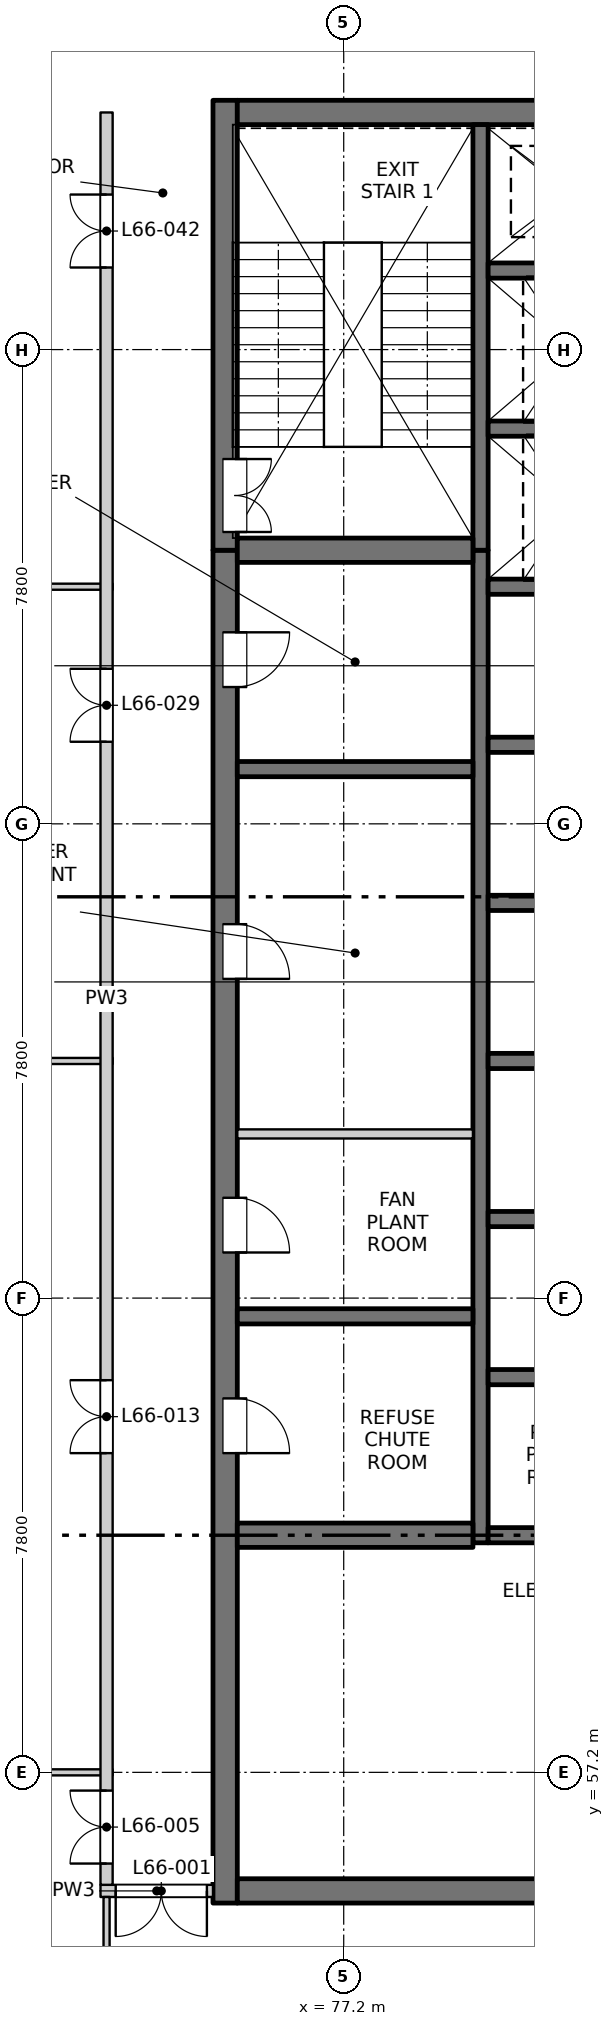
"""IFC4 building model, lengths in metres.
Left out: names, types, materials, properties, quantities, classifications, styles, units other than length and angle.
Written with IfcOpenShell. Run it as: python <this file> out.ifc"""

import sys

from ifc_helpers import new_model, si_unit, direction, frame, frame_2d, origin, place, context, subcontext, project, spatial, rectangle, extrude, element, fill, save


model = new_model("IFC4")
c1 = context("Model", 3, precision=1e-05, world=origin(), true_north=direction((0.0, 1.0)))
c2 = subcontext(c1, "Body", "Model", "MODEL_VIEW")
j1 = project(units=[si_unit("LENGTHUNIT", "METRE"), si_unit("PLANEANGLEUNIT", "RADIAN")], contexts=[c1])
p1 = place(None, origin())
s1 = spatial("IfcSite", under=j1, at=p1, CompositionType="ELEMENT")
p2 = place(p1, origin())
s2 = spatial("IfcBuilding", under=s1, at=p2, CompositionType="ELEMENT")
p3 = place(p2, frame((0.0, 0.0, 241.5)))
s3 = spatial("IfcBuildingStorey", under=s2, at=p3, CompositionType="ELEMENT", Elevation=241.5)
p4 = place(p3, frame((75.25, 55.05, -0.3), z_axis=(0.0, 0.0, 1.0), x_axis=(0.0, 1.0, 0.0)))
e1 = element("IfcWall", 1, at=p4, inside=s3, PredefinedType="SOLIDWALL", context=c2, shape_type="SweptSolid", body=[
    extrude(rectangle(XDim=22.25, YDim=0.4, at=frame_2d((11.125, 0.0))), origin(), (0.0, 0.0, 1.0), 4.5),
])
p5 = place(p4, frame((7.4, 0.0, 0.3)))
e2 = element("IfcOpeningElement", 2, at=p5, cuts=e1, PredefinedType="OPENING", context=c2, shape_type="SweptSolid", body=[
    extrude(rectangle(XDim=0.9, YDim=2.1, at=frame_2d((0.45, 1.05))), frame((0.0, 0.21, 0.0), z_axis=(0.0, -1.0, 0.0), x_axis=(1.0, 0.0, 0.0)), (0.0, 0.0, 1.0), 0.42),
])
p6 = place(p4, frame((10.7, 0.0, 0.3)))
e3 = element("IfcOpeningElement", 3, at=p6, cuts=e1, PredefinedType="OPENING", context=c2, shape_type="SweptSolid", body=[
    extrude(rectangle(XDim=0.9, YDim=2.1, at=frame_2d((0.45, 1.05))), frame((0.0, 0.21, 0.0), z_axis=(0.0, -1.0, 0.0), x_axis=(1.0, 0.0, 0.0)), (0.0, 0.0, 1.0), 0.42),
])
p7 = place(p4, frame((15.2, 0.0, 0.3)))
e4 = element("IfcOpeningElement", 4, at=p7, cuts=e1, PredefinedType="OPENING", context=c2, shape_type="SweptSolid", body=[
    extrude(rectangle(XDim=0.9, YDim=2.1, at=frame_2d((0.45, 1.05))), frame((0.0, 0.21, 0.0), z_axis=(0.0, -1.0, 0.0), x_axis=(1.0, 0.0, 0.0)), (0.0, 0.0, 1.0), 0.42),
])
p8 = place(p4, frame((20.0, 0.0, 0.3)))
e5 = element("IfcOpeningElement", 5, at=p8, cuts=e1, PredefinedType="OPENING", context=c2, shape_type="SweptSolid", body=[
    extrude(rectangle(XDim=0.9, YDim=2.1, at=frame_2d((0.45, 1.05))), frame((0.0, 0.21, 0.0), z_axis=(0.0, -1.0, 0.0), x_axis=(1.0, 0.0, 0.0)), (0.0, 0.0, 1.0), 0.42),
])
p9 = place(p3, frame((75.25, 77.3, -0.3), z_axis=(0.0, 0.0, 1.0), x_axis=(0.0, 1.0, 0.0)))
e6 = element("IfcWall", 6, at=p9, inside=s3, PredefinedType="SOLIDWALL", context=c2, shape_type="SweptSolid", body=[
    extrude(rectangle(XDim=7.4, YDim=0.4, at=frame_2d((3.7, 0.0))), origin(), (0.0, 0.0, 1.0), 4.5),
])
p10 = place(p9, frame((0.3, 0.0, 0.3)))
e7 = element("IfcOpeningElement", 7, at=p10, cuts=e6, PredefinedType="OPENING", context=c2, shape_type="SweptSolid", body=[
    extrude(rectangle(XDim=1.2, YDim=2.1, at=frame_2d((0.6, 1.05))), frame((0.0, 0.21, 0.0), z_axis=(0.0, -1.0, 0.0), x_axis=(1.0, 0.0, 0.0)), (0.0, 0.0, 1.0), 0.42),
])
p11 = place(p3, frame((75.45, 55.25, -0.3), z_axis=(0.0, 0.0, 1.0), x_axis=(1.0, 0.0, 0.0)))
e8 = element("IfcWall", 8, at=p11, inside=s3, PredefinedType="SOLIDWALL", context=c2, shape_type="SweptSolid", body=[
    extrude(rectangle(XDim=19.1, YDim=0.4, at=frame_2d((9.55, 0.0))), origin(), (0.0, 0.0, 1.0), 4.5),
])
p12 = place(p11, frame((7.3, 0.0, 0.3)))
e9 = element("IfcOpeningElement", 9, at=p12, cuts=e8, PredefinedType="OPENING", context=c2, shape_type="SweptSolid", body=[
    extrude(rectangle(XDim=1.5, YDim=2.1, at=frame_2d((0.75, 1.05))), frame((0.0, 0.21, 0.0), z_axis=(0.0, -1.0, 0.0), x_axis=(1.0, 0.0, 0.0)), (0.0, 0.0, 1.0), 0.42),
])
p13 = place(p3, frame((75.45, 84.5, -0.3), z_axis=(0.0, 0.0, 1.0), x_axis=(1.0, 0.0, 0.0)))
e10 = element("IfcWall", 10, at=p13, inside=s3, PredefinedType="SOLIDWALL", context=c2, shape_type="SweptSolid", body=[
    extrude(rectangle(XDim=19.1, YDim=0.4, at=frame_2d((9.55, 0.0))), origin(), (0.0, 0.0, 1.0), 4.5),
])
p14 = place(p3, frame((79.45, 60.975, -0.3), z_axis=(0.0, 0.0, 1.0), x_axis=(0.0, 1.0, 0.0)))
e11 = element("IfcWall", 11, at=p14, inside=s3, PredefinedType="SOLIDWALL", context=c2, shape_type="SweptSolid", body=[
    extrude(rectangle(XDim=16.325, YDim=0.25, at=frame_2d((8.163, 0.0))), origin(), (0.0, 0.0, 1.0), 4.5),
])
p15 = place(p3, frame((79.45, 77.3, -0.3), z_axis=(0.0, 0.0, 1.0), x_axis=(0.0, 1.0, 0.0)))
e12 = element("IfcWall", 12, at=p15, inside=s3, PredefinedType="SOLIDWALL", context=c2, shape_type="SweptSolid", body=[
    extrude(rectangle(XDim=7.0, YDim=0.25, at=frame_2d((3.5, 0.0))), origin(), (0.0, 0.0, 1.0), 4.5),
])
for number, where, z_axis, x_axis in (
    (13, (79.575, 61.1, -0.3), (0.0, 0.0, 1.0), (1.0, 0.0, 0.0)),
    (14, (79.575, 63.7, -0.3), (0.0, 0.0, 1.0), (1.0, 0.0, 0.0)),
    (15, (79.575, 66.3, -0.3), (0.0, 0.0, 1.0), (1.0, 0.0, 0.0)),
    (16, (79.575, 68.9, -0.3), (0.0, 0.0, 1.0), (1.0, 0.0, 0.0)),
    (17, (79.575, 71.5, -0.3), (0.0, 0.0, 1.0), (1.0, 0.0, 0.0)),
    (18, (79.575, 74.1, -0.3), (0.0, 0.0, 1.0), (1.0, 0.0, 0.0)),
    (19, (79.575, 76.7, -0.3), (0.0, 0.0, 1.0), (1.0, 0.0, 0.0)),
    (20, (79.575, 79.3, -0.3), (0.0, 0.0, 1.0), (1.0, 0.0, 0.0)),
    (21, (79.575, 81.9, -0.3), (0.0, 0.0, 1.0), (1.0, 0.0, 0.0)),
):
    element("IfcWall", number, at=place(p3, frame(where, z_axis=z_axis, x_axis=x_axis)), inside=s3, PredefinedType="SOLIDWALL", context=c2, shape_type="SweptSolid", body=[
        extrude(rectangle(XDim=3.0, YDim=0.25, at=frame_2d((1.5, 0.0))), origin(), (0.0, 0.0, 1.0), 4.5),
    ])
p16 = place(p3, frame((75.45, 61.1, -0.3), z_axis=(0.0, 0.0, 1.0), x_axis=(1.0, 0.0, 0.0)))
e22 = element("IfcWall", 22, at=p16, inside=s3, PredefinedType="SOLIDWALL", context=c2, shape_type="SweptSolid", body=[
    extrude(rectangle(XDim=3.875, YDim=0.4, at=frame_2d((1.938, 0.0))), origin(), (0.0, 0.0, 1.0), 4.5),
])
for number, where, z_axis, x_axis in (
    (23, (75.45, 64.7, -0.3), (0.0, 0.0, 1.0), (1.0, 0.0, 0.0)),
    (24, (75.45, 73.7, -0.3), (0.0, 0.0, 1.0), (1.0, 0.0, 0.0)),
):
    element("IfcWall", number, at=place(p3, frame(where, z_axis=z_axis, x_axis=x_axis)), inside=s3, PredefinedType="SOLIDWALL", context=c2, shape_type="SweptSolid", body=[
        extrude(rectangle(XDim=3.875, YDim=0.25, at=frame_2d((1.938, 0.0))), origin(), (0.0, 0.0, 1.0), 4.5),
    ])
p17 = place(p3, frame((75.45, 77.3, -0.3), z_axis=(0.0, 0.0, 1.0), x_axis=(1.0, 0.0, 0.0)))
e25 = element("IfcWall", 25, at=p17, inside=s3, PredefinedType="SOLIDWALL", context=c2, shape_type="SweptSolid", body=[
    extrude(rectangle(XDim=3.875, YDim=0.4, at=frame_2d((1.938, 0.0))), origin(), (0.0, 0.0, 1.0), 4.5),
])
p18 = place(p3, frame((73.2, 55.25, 0.0), z_axis=(0.0, 0.0, 1.0), x_axis=(1.0, 0.0, 0.0)))
e26 = element("IfcWall", 26, at=p18, inside=s3, PredefinedType="PARTITIONING", context=c2, shape_type="SweptSolid", body=[
    extrude(rectangle(XDim=1.85, YDim=0.2, at=frame_2d((0.925, 0.0))), origin(), (0.0, 0.0, 1.0), 4.2),
])
p19 = place(p18, frame((0.25, 0.0, 0.0)))
e27 = element("IfcOpeningElement", 27, at=p19, cuts=e26, PredefinedType="OPENING", context=c2, shape_type="SweptSolid", body=[
    extrude(rectangle(XDim=1.5, YDim=2.1, at=frame_2d((0.75, 1.05))), frame((0.0, 0.11, 0.0), z_axis=(0.0, -1.0, 0.0), x_axis=(1.0, 0.0, 0.0)), (0.0, 0.0, 1.0), 0.22),
])
p20 = place(p3, frame((61.6, 57.2, 0.0), z_axis=(0.0, 0.0, 1.0), x_axis=(1.0, 0.0, 0.0)))
e28 = element("IfcWall", 28, at=p20, inside=s3, PredefinedType="PARTITIONING", context=c2, shape_type="SweptSolid", body=[
    extrude(rectangle(XDim=11.8, YDim=0.1, at=frame_2d((5.9, 0.0))), origin(), (0.0, 0.0, 1.0), 4.2),
])
p21 = place(p3, frame((75.45, 67.7, 0.0), z_axis=(0.0, 0.0, 1.0), x_axis=(1.0, 0.0, 0.0)))
e29 = element("IfcWall", 29, at=p21, inside=s3, PredefinedType="PARTITIONING", context=c2, shape_type="SweptSolid", body=[
    extrude(rectangle(XDim=3.875, YDim=0.15, at=frame_2d((1.938, 0.0))), origin(), (0.0, 0.0, 1.0), 4.2),
])
for number, where, z_axis, x_axis in (
    (30, (65.5, 68.9, 0.0), (0.0, 0.0, 1.0), (1.0, 0.0, 0.0)),
    (31, (65.5, 76.7, 0.0), (0.0, 0.0, 1.0), (1.0, 0.0, 0.0)),
):
    element("IfcWall", number, at=place(p3, frame(where, z_axis=z_axis, x_axis=x_axis)), inside=s3, PredefinedType="PARTITIONING", context=c2, shape_type="SweptSolid", body=[
        extrude(rectangle(XDim=7.9, YDim=0.1, at=frame_2d((3.95, 0.0))), origin(), (0.0, 0.0, 1.0), 3.6),
    ])
p22 = place(p3, frame((73.3, 45.5, 0.0), z_axis=(0.0, 0.0, 1.0), x_axis=(0.0, 1.0, 0.0)))
e32 = element("IfcWall", 32, at=p22, inside=s3, PredefinedType="PARTITIONING", context=c2, shape_type="SweptSolid", body=[
    extrude(rectangle(XDim=9.65, YDim=0.1, at=frame_2d((4.825, 0.0))), origin(), (0.0, 0.0, 1.0), 4.2),
])
p23 = place(p3, frame((73.3, 55.35, 0.0), z_axis=(0.0, 0.0, 1.0), x_axis=(0.0, 1.0, 0.0)))
e33 = element("IfcWall", 33, at=p23, inside=s3, PredefinedType="PARTITIONING", context=c2, shape_type="SweptSolid", body=[
    extrude(rectangle(XDim=29.15, YDim=0.2, at=frame_2d((14.575, 0.0))), origin(), (0.0, 0.0, 1.0), 4.2),
])
p24 = place(p23, frame((0.35, 0.0, 0.0)))
e34 = element("IfcOpeningElement", 34, at=p24, cuts=e33, PredefinedType="OPENING", context=c2, shape_type="SweptSolid", body=[
    extrude(rectangle(XDim=1.2, YDim=2.1, at=frame_2d((0.6, 1.05))), frame((0.0, 0.11, 0.0), z_axis=(0.0, -1.0, 0.0), x_axis=(1.0, 0.0, 0.0)), (0.0, 0.0, 1.0), 0.22),
])
p25 = place(p23, frame((7.1, 0.0, 0.0)))
e35 = element("IfcOpeningElement", 35, at=p25, cuts=e33, PredefinedType="OPENING", context=c2, shape_type="SweptSolid", body=[
    extrude(rectangle(XDim=1.2, YDim=2.1, at=frame_2d((0.6, 1.05))), frame((0.0, 0.11, 0.0), z_axis=(0.0, -1.0, 0.0), x_axis=(1.0, 0.0, 0.0)), (0.0, 0.0, 1.0), 0.22),
])
p26 = place(p23, frame((18.8, 0.0, 0.0)))
e36 = element("IfcOpeningElement", 36, at=p26, cuts=e33, PredefinedType="OPENING", context=c2, shape_type="SweptSolid", body=[
    extrude(rectangle(XDim=1.2, YDim=2.1, at=frame_2d((0.6, 1.05))), frame((0.0, 0.11, 0.0), z_axis=(0.0, -1.0, 0.0), x_axis=(1.0, 0.0, 0.0)), (0.0, 0.0, 1.0), 0.22),
])
p27 = place(p23, frame((26.6, 0.0, 0.0)))
e37 = element("IfcOpeningElement", 37, at=p27, cuts=e33, PredefinedType="OPENING", context=c2, shape_type="SweptSolid", body=[
    extrude(rectangle(XDim=1.2, YDim=2.1, at=frame_2d((0.6, 1.05))), frame((0.0, 0.11, 0.0), z_axis=(0.0, -1.0, 0.0), x_axis=(1.0, 0.0, 0.0)), (0.0, 0.0, 1.0), 0.22),
])
p28 = place(p19, origin())
e38 = element("IfcDoor", 38, at=p28, inside=s3, OperationType="DOUBLE_DOOR_SINGLE_SWING", PredefinedType="DOOR", context=c2, shape_type="SweptSolid", body=[
    extrude(rectangle(XDim=1.5, YDim=2.1, at=frame_2d((0.75, 1.05))), frame((0.0, 0.025, 0.0), z_axis=(0.0, -1.0, 0.0), x_axis=(1.0, 0.0, 0.0)), (0.0, 0.0, 1.0), 0.05),
])
fill(e27, e38)
p29 = place(p24, origin())
e39 = element("IfcDoor", 39, at=p29, inside=s3, OperationType="DOUBLE_DOOR_SINGLE_SWING", PredefinedType="DOOR", context=c2, shape_type="SweptSolid", body=[
    extrude(rectangle(XDim=1.2, YDim=2.1, at=frame_2d((0.6, 1.05))), frame((0.0, 0.025, 0.0), z_axis=(0.0, -1.0, 0.0), x_axis=(1.0, 0.0, 0.0)), (0.0, 0.0, 1.0), 0.05),
])
fill(e34, e39)
p30 = place(p5, origin())
e40 = element("IfcDoor", 40, at=p30, inside=s3, OperationType="SINGLE_SWING_RIGHT", PredefinedType="DOOR", context=c2, shape_type="SweptSolid", body=[
    extrude(rectangle(XDim=0.9, YDim=2.1, at=frame_2d((0.45, 1.05))), frame((0.0, -0.135, 0.0), z_axis=(0.0, -1.0, 0.0), x_axis=(1.0, 0.0, 0.0)), (0.0, 0.0, 1.0), 0.05),
])
fill(e2, e40)
p31 = place(p25, origin())
e41 = element("IfcDoor", 41, at=p31, inside=s3, OperationType="DOUBLE_DOOR_SINGLE_SWING", PredefinedType="DOOR", context=c2, shape_type="SweptSolid", body=[
    extrude(rectangle(XDim=1.2, YDim=2.1, at=frame_2d((0.6, 1.05))), frame((0.0, 0.025, 0.0), z_axis=(0.0, -1.0, 0.0), x_axis=(1.0, 0.0, 0.0)), (0.0, 0.0, 1.0), 0.05),
])
fill(e35, e41)
p32 = place(p6, origin())
e42 = element("IfcDoor", 42, at=p32, inside=s3, OperationType="SINGLE_SWING_RIGHT", PredefinedType="DOOR", context=c2, shape_type="SweptSolid", body=[
    extrude(rectangle(XDim=0.9, YDim=2.1, at=frame_2d((0.45, 1.05))), frame((0.0, -0.135, 0.0), z_axis=(0.0, -1.0, 0.0), x_axis=(1.0, 0.0, 0.0)), (0.0, 0.0, 1.0), 0.05),
])
fill(e3, e42)
p33 = place(p7, origin())
e43 = element("IfcDoor", 43, at=p33, inside=s3, OperationType="SINGLE_SWING_RIGHT", PredefinedType="DOOR", context=c2, shape_type="SweptSolid", body=[
    extrude(rectangle(XDim=0.9, YDim=2.1, at=frame_2d((0.45, 1.05))), frame((0.0, -0.135, 0.0), z_axis=(0.0, -1.0, 0.0), x_axis=(1.0, 0.0, 0.0)), (0.0, 0.0, 1.0), 0.05),
])
fill(e4, e43)
p34 = place(p26, origin())
e44 = element("IfcDoor", 44, at=p34, inside=s3, OperationType="DOUBLE_DOOR_SINGLE_SWING", PredefinedType="DOOR", context=c2, shape_type="SweptSolid", body=[
    extrude(rectangle(XDim=1.2, YDim=2.1, at=frame_2d((0.6, 1.05))), frame((0.0, 0.025, 0.0), z_axis=(0.0, -1.0, 0.0), x_axis=(1.0, 0.0, 0.0)), (0.0, 0.0, 1.0), 0.05),
])
fill(e36, e44)
p35 = place(p8, origin())
e45 = element("IfcDoor", 45, at=p35, inside=s3, OperationType="SINGLE_SWING_LEFT", PredefinedType="DOOR", context=c2, shape_type="SweptSolid", body=[
    extrude(rectangle(XDim=0.9, YDim=2.1, at=frame_2d((0.45, 1.05))), frame((0.0, -0.135, 0.0), z_axis=(0.0, -1.0, 0.0), x_axis=(1.0, 0.0, 0.0)), (0.0, 0.0, 1.0), 0.05),
])
fill(e5, e45)
p36 = place(p10, origin())
e46 = element("IfcDoor", 46, at=p36, inside=s3, OperationType="DOUBLE_DOOR_SINGLE_SWING", PredefinedType="DOOR", context=c2, shape_type="SweptSolid", body=[
    extrude(rectangle(XDim=1.2, YDim=2.1, at=frame_2d((0.6, 1.05))), frame((0.0, -0.135, 0.0), z_axis=(0.0, -1.0, 0.0), x_axis=(1.0, 0.0, 0.0)), (0.0, 0.0, 1.0), 0.05),
])
fill(e7, e46)
p37 = place(p27, origin())
e47 = element("IfcDoor", 47, at=p37, inside=s3, OperationType="DOUBLE_DOOR_SINGLE_SWING", PredefinedType="DOOR", context=c2, shape_type="SweptSolid", body=[
    extrude(rectangle(XDim=1.2, YDim=2.1, at=frame_2d((0.6, 1.05))), frame((0.0, 0.025, 0.0), z_axis=(0.0, -1.0, 0.0), x_axis=(1.0, 0.0, 0.0)), (0.0, 0.0, 1.0), 0.05),
])
fill(e37, e47)
save(model, sys.argv[1])
